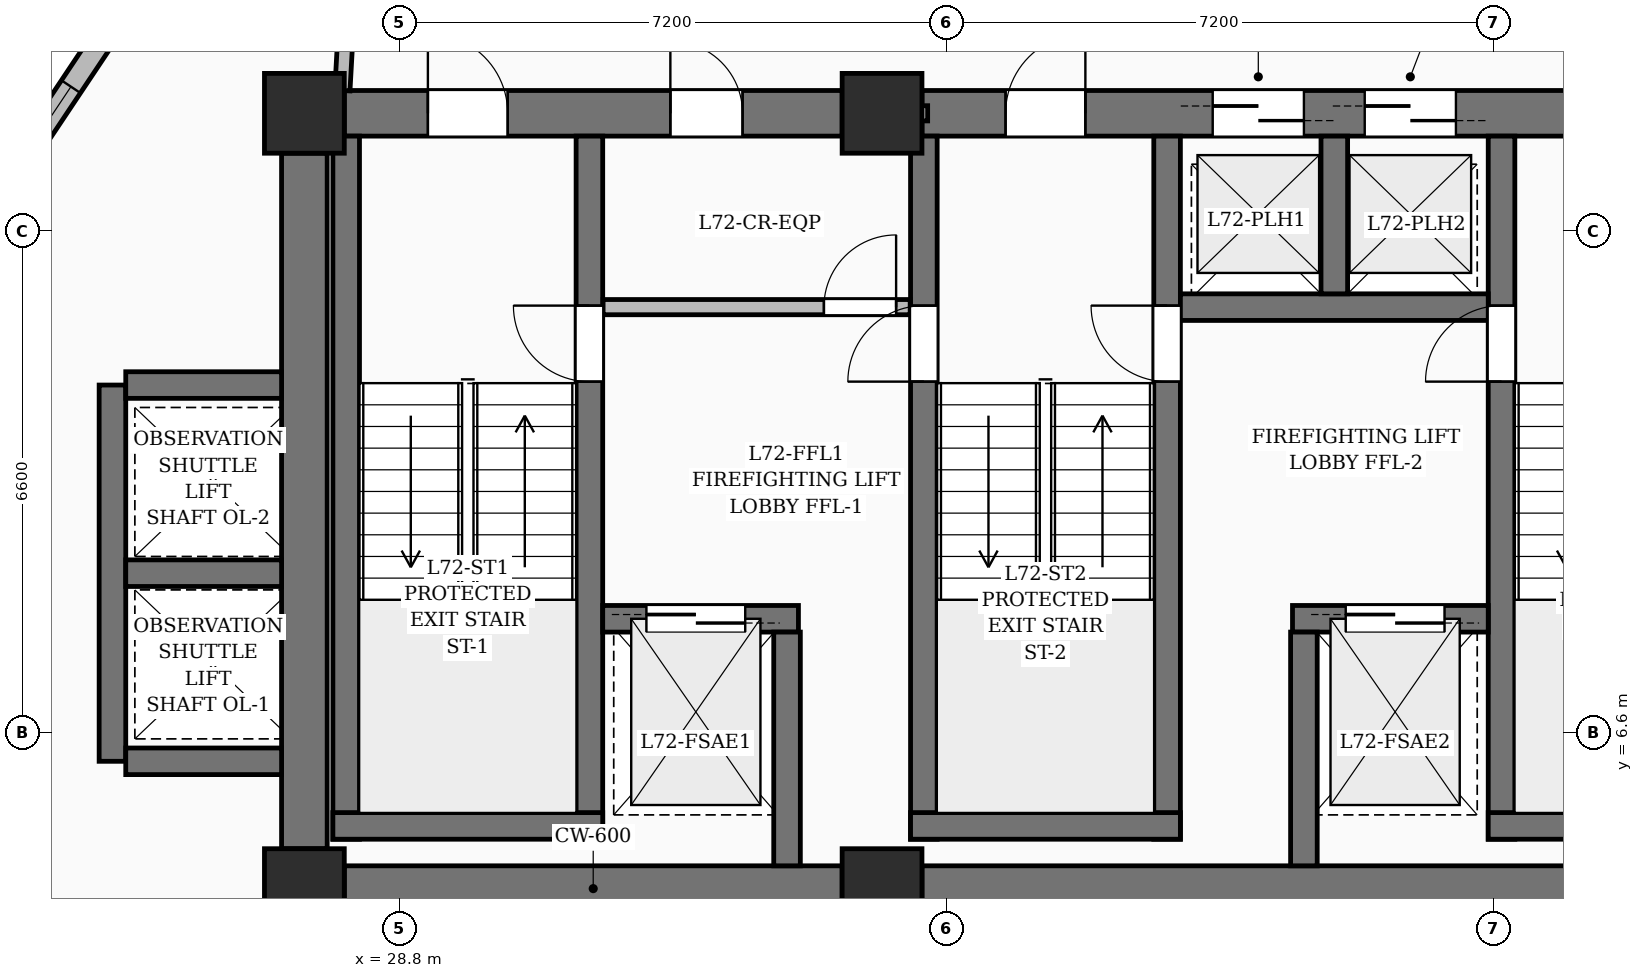
"""IFC4 building model, lengths in metres.
Left out: names, types, materials, properties, quantities, classifications, styles, units other than length and angle.
Written with IfcOpenShell. Run it as: python <this file> out.ifc"""

import sys

from ifc_helpers import new_model, si_unit, direction, frame, frame_2d, origin, origin_2d, place, context, subcontext, project, spatial, rectangle, extrude, element, fill, save


model = new_model("IFC4")
c1 = context("Model", 3, precision=1e-05, world=origin(), true_north=direction((0.0, 1.0)))
c2 = subcontext(c1, "Body", "Model", "MODEL_VIEW")
j1 = project(units=[si_unit("LENGTHUNIT", "METRE"), si_unit("PLANEANGLEUNIT", "RADIAN")], contexts=[c1])
p1 = place(None, origin())
s1 = spatial("IfcSite", under=j1, at=p1, CompositionType="ELEMENT")
p2 = place(p1, origin())
s2 = spatial("IfcBuilding", under=s1, at=p2, CompositionType="ELEMENT")
p3 = place(p2, frame((0.0, 0.0, 278.25)))
s3 = spatial("IfcBuildingStorey", under=s2, at=p3, CompositionType="ELEMENT", Elevation=278.25)
for number, where, z_axis, x_axis in (
    (1, (27.55, 4.55, 0.0), (0.0, 0.0, 1.0), (1.0, 0.0, 0.0)),
    (2, (35.15, 4.55, 0.0), (0.0, 0.0, 1.0), (1.0, 0.0, 0.0)),
    (3, (27.55, 14.75, 0.0), (0.0, 0.0, 1.0), (1.0, 0.0, 0.0)),
    (4, (35.15, 14.75, 0.0), (0.0, 0.0, 1.0), (1.0, 0.0, 0.0)),
):
    element("IfcColumn", number, at=place(p3, frame(where, z_axis=z_axis, x_axis=x_axis)), inside=s3, PredefinedType="COLUMN", context=c2, shape_type="SweptSolid", body=[
        extrude(rectangle(XDim=1.05, YDim=1.05, at=origin_2d()), origin(), (0.0, 0.0, 1.0), 3.75),
    ])
p4 = place(p3, frame((28.075, 4.55, 0.0), z_axis=(0.0, 0.0, 1.0), x_axis=(1.0, 0.0, 0.0)))
e5 = element("IfcWall", 5, at=p4, inside=s3, PredefinedType="SHEAR", context=c2, shape_type="SweptSolid", body=[
    extrude(rectangle(XDim=6.55, YDim=0.6, at=frame_2d((3.275, 0.0))), origin(), (0.0, 0.0, 1.0), 3.75),
])
p5 = place(p3, frame((35.675, 4.55, 0.0), z_axis=(0.0, 0.0, 1.0), x_axis=(1.0, 0.0, 0.0)))
e6 = element("IfcWall", 6, at=p5, inside=s3, PredefinedType="SHEAR", context=c2, shape_type="SweptSolid", body=[
    extrude(rectangle(XDim=10.85, YDim=0.6, at=frame_2d((5.425, 0.0))), origin(), (0.0, 0.0, 1.0), 3.75),
])
p6 = place(p3, frame((28.075, 14.75, 0.0), z_axis=(0.0, 0.0, 1.0), x_axis=(1.0, 0.0, 0.0)))
e7 = element("IfcWall", 7, at=p6, inside=s3, PredefinedType="SHEAR", context=c2, shape_type="SweptSolid", body=[
    extrude(rectangle(XDim=6.55, YDim=0.6, at=frame_2d((3.275, 0.0))), origin(), (0.0, 0.0, 1.0), 3.75),
])
p7 = place(p6, frame((1.1, 0.0, 0.0)))
e8 = element("IfcOpeningElement", 8, at=p7, cuts=e7, PredefinedType="OPENING", context=c2, shape_type="SweptSolid", body=[
    extrude(rectangle(XDim=1.05, YDim=2.15, at=frame_2d((0.525, 1.075))), frame((0.0, 0.31, 0.0), z_axis=(0.0, -1.0, 0.0), x_axis=(1.0, 0.0, 0.0)), (0.0, 0.0, 1.0), 0.62),
])
p8 = place(p6, frame((4.29, 0.0, 0.0)))
e9 = element("IfcOpeningElement", 9, at=p8, cuts=e7, PredefinedType="OPENING", context=c2, shape_type="SweptSolid", body=[
    extrude(rectangle(XDim=0.95, YDim=2.15, at=frame_2d((0.475, 1.075))), frame((0.0, 0.31, 0.0), z_axis=(0.0, -1.0, 0.0), x_axis=(1.0, 0.0, 0.0)), (0.0, 0.0, 1.0), 0.62),
])
p9 = place(p3, frame((35.675, 14.75, 0.0), z_axis=(0.0, 0.0, 1.0), x_axis=(1.0, 0.0, 0.0)))
e10 = element("IfcWall", 10, at=p9, inside=s3, PredefinedType="SHEAR", context=c2, shape_type="SweptSolid", body=[
    extrude(rectangle(XDim=10.85, YDim=0.6, at=frame_2d((5.425, 0.0))), origin(), (0.0, 0.0, 1.0), 3.75),
])
p10 = place(p9, frame((1.1, 0.0, 0.0)))
e11 = element("IfcOpeningElement", 11, at=p10, cuts=e10, PredefinedType="OPENING", context=c2, shape_type="SweptSolid", body=[
    extrude(rectangle(XDim=1.05, YDim=2.15, at=frame_2d((0.525, 1.075))), frame((0.0, 0.31, 0.0), z_axis=(0.0, -1.0, 0.0), x_axis=(1.0, 0.0, 0.0)), (0.0, 0.0, 1.0), 0.62),
])
p11 = place(p9, frame((8.7, 0.0, 0.0)))
e12 = element("IfcOpeningElement", 12, at=p11, cuts=e10, PredefinedType="OPENING", context=c2, shape_type="SweptSolid", body=[
    extrude(rectangle(XDim=1.05, YDim=2.15, at=frame_2d((0.525, 1.075))), frame((0.0, 0.31, 0.0), z_axis=(0.0, -1.0, 0.0), x_axis=(1.0, 0.0, 0.0)), (0.0, 0.0, 1.0), 0.62),
])
p12 = place(p9, frame((3.825, 0.0, 0.0)))
e13 = element("IfcOpeningElement", 13, at=p12, cuts=e10, PredefinedType="OPENING", context=c2, shape_type="SweptSolid", body=[
    extrude(rectangle(XDim=1.2, YDim=2.2, at=frame_2d((0.6, 1.1))), frame((0.0, 0.31, 0.0), z_axis=(0.0, -1.0, 0.0), x_axis=(1.0, 0.0, 0.0)), (0.0, 0.0, 1.0), 0.62),
])
p13 = place(p9, frame((5.825, 0.0, 0.0)))
e14 = element("IfcOpeningElement", 14, at=p13, cuts=e10, PredefinedType="OPENING", context=c2, shape_type="SweptSolid", body=[
    extrude(rectangle(XDim=1.2, YDim=2.2, at=frame_2d((0.6, 1.1))), frame((0.0, 0.31, 0.0), z_axis=(0.0, -1.0, 0.0), x_axis=(1.0, 0.0, 0.0)), (0.0, 0.0, 1.0), 0.62),
])
p14 = place(p3, frame((27.55, 5.075, 0.0), z_axis=(0.0, 0.0, 1.0), x_axis=(0.0, 1.0, 0.0)))
e15 = element("IfcWall", 15, at=p14, inside=s3, PredefinedType="SHEAR", context=c2, shape_type="SweptSolid", body=[
    extrude(rectangle(XDim=9.15, YDim=0.6, at=frame_2d((4.575, 0.0))), origin(), (0.0, 0.0, 1.0), 3.75),
])
p15 = place(p3, frame((28.1, 5.2, 0.0), z_axis=(0.0, 0.0, 1.0), x_axis=(0.0, 1.0, 0.0)))
e16 = element("IfcWall", 16, at=p15, inside=s3, PredefinedType="SOLIDWALL", context=c2, shape_type="SweptSolid", body=[
    extrude(rectangle(XDim=9.25, YDim=0.35, at=frame_2d((4.625, 0.0))), origin(), (0.0, 0.0, 1.0), 3.75),
])
p16 = place(p3, frame((31.3, 5.2, 0.0), z_axis=(0.0, 0.0, 1.0), x_axis=(0.0, 1.0, 0.0)))
e17 = element("IfcWall", 17, at=p16, inside=s3, PredefinedType="SOLIDWALL", context=c2, shape_type="SweptSolid", body=[
    extrude(rectangle(XDim=9.25, YDim=0.35, at=frame_2d((4.625, 0.0))), origin(), (0.0, 0.0, 1.0), 3.75),
])
p17 = place(p16, frame((6.02, 0.0, 0.0)))
e18 = element("IfcOpeningElement", 18, at=p17, cuts=e17, PredefinedType="OPENING", context=c2, shape_type="SweptSolid", body=[
    extrude(rectangle(XDim=1.0, YDim=2.15, at=frame_2d((0.5, 1.075))), frame((0.0, 0.185, 0.0), z_axis=(0.0, -1.0, 0.0), x_axis=(1.0, 0.0, 0.0)), (0.0, 0.0, 1.0), 0.37),
])
p18 = place(p3, frame((27.925, 5.375, 0.0), z_axis=(0.0, 0.0, 1.0), x_axis=(1.0, 0.0, 0.0)))
e19 = element("IfcWall", 19, at=p18, inside=s3, PredefinedType="SOLIDWALL", context=c2, shape_type="SweptSolid", body=[
    extrude(rectangle(XDim=3.55, YDim=0.35, at=frame_2d((1.775, 0.0))), origin(), (0.0, 0.0, 1.0), 3.75),
])
p19 = place(p3, frame((35.7, 5.2, 0.0), z_axis=(0.0, 0.0, 1.0), x_axis=(0.0, 1.0, 0.0)))
e20 = element("IfcWall", 20, at=p19, inside=s3, PredefinedType="SOLIDWALL", context=c2, shape_type="SweptSolid", body=[
    extrude(rectangle(XDim=9.25, YDim=0.35, at=frame_2d((4.625, 0.0))), origin(), (0.0, 0.0, 1.0), 3.75),
])
p20 = place(p19, frame((6.02, 0.0, 0.0)))
e21 = element("IfcOpeningElement", 21, at=p20, cuts=e20, PredefinedType="OPENING", context=c2, shape_type="SweptSolid", body=[
    extrude(rectangle(XDim=1.0, YDim=2.15, at=frame_2d((0.5, 1.075))), frame((0.0, 0.185, 0.0), z_axis=(0.0, -1.0, 0.0), x_axis=(1.0, 0.0, 0.0)), (0.0, 0.0, 1.0), 0.37),
])
p21 = place(p3, frame((38.9, 5.2, 0.0), z_axis=(0.0, 0.0, 1.0), x_axis=(0.0, 1.0, 0.0)))
e22 = element("IfcWall", 22, at=p21, inside=s3, PredefinedType="SOLIDWALL", context=c2, shape_type="SweptSolid", body=[
    extrude(rectangle(XDim=9.25, YDim=0.35, at=frame_2d((4.625, 0.0))), origin(), (0.0, 0.0, 1.0), 3.75),
])
p22 = place(p21, frame((6.02, 0.0, 0.0)))
e23 = element("IfcOpeningElement", 23, at=p22, cuts=e22, PredefinedType="OPENING", context=c2, shape_type="SweptSolid", body=[
    extrude(rectangle(XDim=1.0, YDim=2.15, at=frame_2d((0.5, 1.075))), frame((0.0, 0.185, 0.0), z_axis=(0.0, -1.0, 0.0), x_axis=(1.0, 0.0, 0.0)), (0.0, 0.0, 1.0), 0.37),
])
p23 = place(p3, frame((35.525, 5.375, 0.0), z_axis=(0.0, 0.0, 1.0), x_axis=(1.0, 0.0, 0.0)))
e24 = element("IfcWall", 24, at=p23, inside=s3, PredefinedType="SOLIDWALL", context=c2, shape_type="SweptSolid", body=[
    extrude(rectangle(XDim=3.55, YDim=0.35, at=frame_2d((1.775, 0.0))), origin(), (0.0, 0.0, 1.0), 3.75),
])
p24 = place(p3, frame((43.3, 5.2, 0.0), z_axis=(0.0, 0.0, 1.0), x_axis=(0.0, 1.0, 0.0)))
e25 = element("IfcWall", 25, at=p24, inside=s3, PredefinedType="SOLIDWALL", context=c2, shape_type="SweptSolid", body=[
    extrude(rectangle(XDim=9.25, YDim=0.35, at=frame_2d((4.625, 0.0))), origin(), (0.0, 0.0, 1.0), 3.75),
])
p25 = place(p24, frame((6.02, 0.0, 0.0)))
e26 = element("IfcOpeningElement", 26, at=p25, cuts=e25, PredefinedType="OPENING", context=c2, shape_type="SweptSolid", body=[
    extrude(rectangle(XDim=1.0, YDim=2.15, at=frame_2d((0.5, 1.075))), frame((0.0, 0.185, 0.0), z_axis=(0.0, -1.0, 0.0), x_axis=(1.0, 0.0, 0.0)), (0.0, 0.0, 1.0), 0.37),
])
p26 = place(p3, frame((43.125, 5.375, 0.0), z_axis=(0.0, 0.0, 1.0), x_axis=(1.0, 0.0, 0.0)))
e27 = element("IfcWall", 27, at=p26, inside=s3, PredefinedType="SOLIDWALL", context=c2, shape_type="SweptSolid", body=[
    extrude(rectangle(XDim=3.55, YDim=0.35, at=frame_2d((1.775, 0.0))), origin(), (0.0, 0.0, 1.0), 3.75),
])
p27 = place(p3, frame((31.475, 8.1, 0.0), z_axis=(0.0, 0.0, 1.0), x_axis=(1.0, 0.0, 0.0)))
e28 = element("IfcWall", 28, at=p27, inside=s3, PredefinedType="SOLIDWALL", context=c2, shape_type="SweptSolid", body=[
    extrude(rectangle(XDim=2.575, YDim=0.35, at=frame_2d((1.288, 0.0))), origin(), (0.0, 0.0, 1.0), 3.75),
])
p28 = place(p27, frame((0.575, 0.0, 0.0)))
e29 = element("IfcOpeningElement", 29, at=p28, cuts=e28, PredefinedType="OPENING", context=c2, shape_type="SweptSolid", body=[
    extrude(rectangle(XDim=1.3, YDim=2.25, at=frame_2d((0.65, 1.125))), frame((0.0, 0.185, 0.0), z_axis=(0.0, -1.0, 0.0), x_axis=(1.0, 0.0, 0.0)), (0.0, 0.0, 1.0), 0.37),
])
p29 = place(p3, frame((40.55, 8.1, 0.0), z_axis=(0.0, 0.0, 1.0), x_axis=(1.0, 0.0, 0.0)))
e30 = element("IfcWall", 30, at=p29, inside=s3, PredefinedType="SOLIDWALL", context=c2, shape_type="SweptSolid", body=[
    extrude(rectangle(XDim=2.575, YDim=0.35, at=frame_2d((1.288, 0.0))), origin(), (0.0, 0.0, 1.0), 3.75),
])
p30 = place(p29, frame((0.7, 0.0, 0.0)))
e31 = element("IfcOpeningElement", 31, at=p30, cuts=e30, PredefinedType="OPENING", context=c2, shape_type="SweptSolid", body=[
    extrude(rectangle(XDim=1.3, YDim=2.25, at=frame_2d((0.65, 1.125))), frame((0.0, 0.185, 0.0), z_axis=(0.0, -1.0, 0.0), x_axis=(1.0, 0.0, 0.0)), (0.0, 0.0, 1.0), 0.37),
])
for number, where, z_axis, x_axis in (
    (32, (33.9, 4.85, 0.0), (0.0, 0.0, 1.0), (0.0, 1.0, 0.0)),
    (33, (40.7, 4.85, 0.0), (0.0, 0.0, 1.0), (0.0, 1.0, 0.0)),
):
    element("IfcWall", number, at=place(p3, frame(where, z_axis=z_axis, x_axis=x_axis)), inside=s3, PredefinedType="SOLIDWALL", context=c2, shape_type="SweptSolid", body=[
        extrude(rectangle(XDim=3.075, YDim=0.35, at=frame_2d((1.538, 0.0))), origin(), (0.0, 0.0, 1.0), 3.75),
    ])
p31 = place(p3, frame((39.075, 12.2, 0.0), z_axis=(0.0, 0.0, 1.0), x_axis=(1.0, 0.0, 0.0)))
e34 = element("IfcWall", 34, at=p31, inside=s3, PredefinedType="SOLIDWALL", context=c2, shape_type="SweptSolid", body=[
    extrude(rectangle(XDim=4.05, YDim=0.35, at=frame_2d((2.025, 0.0))), origin(), (0.0, 0.0, 1.0), 3.75),
])
p32 = place(p3, frame((41.1, 12.375, 0.0), z_axis=(0.0, 0.0, 1.0), x_axis=(0.0, 1.0, 0.0)))
e35 = element("IfcWall", 35, at=p32, inside=s3, PredefinedType="SOLIDWALL", context=c2, shape_type="SweptSolid", body=[
    extrude(rectangle(XDim=2.075, YDim=0.35, at=frame_2d((1.038, 0.0))), origin(), (0.0, 0.0, 1.0), 3.75),
])
p33 = place(p3, frame((25.025, 6.225, 0.0), z_axis=(0.0, 0.0, 1.0), x_axis=(0.0, 1.0, 0.0)))
e36 = element("IfcWall", 36, at=p33, inside=s3, PredefinedType="SOLIDWALL", context=c2, shape_type="SweptSolid", body=[
    extrude(rectangle(XDim=4.95, YDim=0.35, at=frame_2d((2.475, 0.0))), origin(), (0.0, 0.0, 1.0), 3.75),
])
for number, where, z_axis, x_axis in (
    (37, (25.2, 6.225, 0.0), (0.0, 0.0, 1.0), (1.0, 0.0, 0.0)),
    (38, (25.2, 8.7, 0.0), (0.0, 0.0, 1.0), (1.0, 0.0, 0.0)),
    (39, (25.2, 11.175, 0.0), (0.0, 0.0, 1.0), (1.0, 0.0, 0.0)),
):
    element("IfcWall", number, at=place(p3, frame(where, z_axis=z_axis, x_axis=x_axis)), inside=s3, PredefinedType="SOLIDWALL", context=c2, shape_type="SweptSolid", body=[
        extrude(rectangle(XDim=2.05, YDim=0.35, at=frame_2d((1.025, 0.0))), origin(), (0.0, 0.0, 1.0), 3.75),
    ])
p34 = place(p3, frame((22.258, 11.773, 0.0), z_axis=(0.0, 0.0, 1.0), x_axis=(0.555209579516, 0.831710480163, 0.0)))
e40 = element("IfcWall", 40, at=p34, inside=s3, PredefinedType="SOLIDWALL", context=c2, shape_type="SweptSolid", body=[
    extrude(rectangle(XDim=7.851, YDim=0.3, at=frame_2d((3.926, 0.0))), origin(), (0.0, 0.0, 1.0), 3.5),
])
p35 = place(p34, frame((2.8, 0.0, 0.8)))
e41 = element("IfcOpeningElement", 41, at=p35, cuts=e40, PredefinedType="OPENING", context=c2, shape_type="SweptSolid", body=[
    extrude(rectangle(XDim=1.2, YDim=1.8, at=frame_2d((0.6, 0.9))), frame((0.0, 0.16, 0.0), z_axis=(0.0, -1.0, 0.0), x_axis=(1.0, 0.0, 0.0)), (0.0, 0.0, 1.0), 0.32),
])
p36 = place(p3, frame((34.72, 14.75, 0.0), z_axis=(0.0, 0.0, 1.0), x_axis=(1.0, 0.0, 0.0)))
e42 = element("IfcWall", 42, at=p36, inside=s3, PredefinedType="PARTITIONING", context=c2, shape_type="SweptSolid", body=[
    extrude(rectangle(XDim=1.03, YDim=0.2, at=frame_2d((0.515, 0.0))), origin(), (0.0, 0.0, 1.0), 2.685),
])
p37 = place(p3, frame((31.48, 12.2, 0.0), z_axis=(0.0, 0.0, 1.0), x_axis=(1.0, 0.0, 0.0)))
e43 = element("IfcWall", 43, at=p37, inside=s3, PredefinedType="PARTITIONING", context=c2, shape_type="SweptSolid", body=[
    extrude(rectangle(XDim=4.04, YDim=0.2, at=frame_2d((2.02, 0.0))), origin(), (0.0, 0.0, 1.0), 3.5),
])
p38 = place(p37, frame((2.905, 0.0, 0.0)))
e44 = element("IfcOpeningElement", 44, at=p38, cuts=e43, PredefinedType="OPENING", context=c2, shape_type="SweptSolid", body=[
    extrude(rectangle(XDim=0.95, YDim=2.15, at=frame_2d((0.475, 1.075))), frame((0.0, 0.11, 0.0), z_axis=(0.0, -1.0, 0.0), x_axis=(1.0, 0.0, 0.0)), (0.0, 0.0, 1.0), 0.22),
])
p39 = place(p3, frame((28.212, 17.976, 0.0), z_axis=(0.0, 0.0, 1.0), x_axis=(-0.055234698656, -0.998473398777, 0.0)))
e45 = element("IfcWall", 45, at=p39, inside=s3, PredefinedType="PARTITIONING", context=c2, shape_type="SweptSolid", body=[
    extrude(rectangle(XDim=2.93, YDim=0.2, at=frame_2d((1.465, 0.0))), origin(), (0.0, 0.0, 1.0), 3.5),
])
p40 = place(p35, origin())
e46 = element("IfcWindow", 46, at=p40, inside=s3, PartitioningType="SINGLE_PANEL", PredefinedType="WINDOW", context=c2, shape_type="SweptSolid", body=[
    extrude(rectangle(XDim=1.2, YDim=1.8, at=frame_2d((0.6, 0.9))), frame((0.0, 0.03, 0.0), z_axis=(0.0, -1.0, 0.0), x_axis=(1.0, 0.0, 0.0)), (0.0, 0.0, 1.0), 0.06),
])
fill(e41, e46)
p41 = place(p7, origin())
e47 = element("IfcDoor", 47, at=p41, inside=s3, OperationType="SINGLE_SWING_LEFT", PredefinedType="DOOR", context=c2, shape_type="SweptSolid", body=[
    extrude(rectangle(XDim=1.05, YDim=2.15, at=frame_2d((0.525, 1.075))), frame((0.0, 0.025, 0.0), z_axis=(0.0, -1.0, 0.0), x_axis=(1.0, 0.0, 0.0)), (0.0, 0.0, 1.0), 0.05),
])
fill(e8, e47)
p42 = place(p10, origin())
e48 = element("IfcDoor", 48, at=p42, inside=s3, OperationType="SINGLE_SWING_RIGHT", PredefinedType="DOOR", context=c2, shape_type="SweptSolid", body=[
    extrude(rectangle(XDim=1.05, YDim=2.15, at=frame_2d((0.525, 1.075))), frame((0.0, 0.025, 0.0), z_axis=(0.0, -1.0, 0.0), x_axis=(1.0, 0.0, 0.0)), (0.0, 0.0, 1.0), 0.05),
])
fill(e11, e48)
p43 = place(p17, origin())
e49 = element("IfcDoor", 49, at=p43, inside=s3, OperationType="SINGLE_SWING_RIGHT", PredefinedType="DOOR", context=c2, shape_type="SweptSolid", body=[
    extrude(rectangle(XDim=1.0, YDim=2.15, at=frame_2d((0.5, 1.075))), frame((0.0, 0.025, 0.0), z_axis=(0.0, -1.0, 0.0), x_axis=(1.0, 0.0, 0.0)), (0.0, 0.0, 1.0), 0.05),
])
fill(e18, e49)
p44 = place(p20, origin())
e50 = element("IfcDoor", 50, at=p44, inside=s3, OperationType="SINGLE_SWING_LEFT", PredefinedType="DOOR", context=c2, shape_type="SweptSolid", body=[
    extrude(rectangle(XDim=1.0, YDim=2.15, at=frame_2d((0.5, 1.075))), frame((0.0, 0.025, 0.0), z_axis=(0.0, -1.0, 0.0), x_axis=(1.0, 0.0, 0.0)), (0.0, 0.0, 1.0), 0.05),
])
fill(e21, e50)
p45 = place(p22, origin())
e51 = element("IfcDoor", 51, at=p45, inside=s3, OperationType="SINGLE_SWING_RIGHT", PredefinedType="DOOR", context=c2, shape_type="SweptSolid", body=[
    extrude(rectangle(XDim=1.0, YDim=2.15, at=frame_2d((0.5, 1.075))), frame((0.0, 0.025, 0.0), z_axis=(0.0, -1.0, 0.0), x_axis=(1.0, 0.0, 0.0)), (0.0, 0.0, 1.0), 0.05),
])
fill(e23, e51)
p46 = place(p25, origin())
e52 = element("IfcDoor", 52, at=p46, inside=s3, OperationType="SINGLE_SWING_LEFT", PredefinedType="DOOR", context=c2, shape_type="SweptSolid", body=[
    extrude(rectangle(XDim=1.0, YDim=2.15, at=frame_2d((0.5, 1.075))), frame((0.0, 0.025, 0.0), z_axis=(0.0, -1.0, 0.0), x_axis=(1.0, 0.0, 0.0)), (0.0, 0.0, 1.0), 0.05),
])
fill(e26, e52)
p47 = place(p28, origin())
e53 = element("IfcDoor", 53, at=p47, inside=s3, OperationType="DOUBLE_DOOR_SLIDING", PredefinedType="DOOR", context=c2, shape_type="SweptSolid", body=[
    extrude(rectangle(XDim=1.3, YDim=2.25, at=frame_2d((0.65, 1.125))), frame((0.0, 0.025, 0.0), z_axis=(0.0, -1.0, 0.0), x_axis=(1.0, 0.0, 0.0)), (0.0, 0.0, 1.0), 0.05),
])
fill(e29, e53)
p48 = place(p30, origin())
e54 = element("IfcDoor", 54, at=p48, inside=s3, OperationType="DOUBLE_DOOR_SLIDING", PredefinedType="DOOR", context=c2, shape_type="SweptSolid", body=[
    extrude(rectangle(XDim=1.3, YDim=2.25, at=frame_2d((0.65, 1.125))), frame((0.0, 0.025, 0.0), z_axis=(0.0, -1.0, 0.0), x_axis=(1.0, 0.0, 0.0)), (0.0, 0.0, 1.0), 0.05),
])
fill(e31, e54)
p49 = place(p12, origin())
e55 = element("IfcDoor", 55, at=p49, inside=s3, OperationType="DOUBLE_DOOR_SLIDING", PredefinedType="DOOR", context=c2, shape_type="SweptSolid", body=[
    extrude(rectangle(XDim=1.2, YDim=2.2, at=frame_2d((0.6, 1.1))), frame((0.0, 0.025, 0.0), z_axis=(0.0, -1.0, 0.0), x_axis=(1.0, 0.0, 0.0)), (0.0, 0.0, 1.0), 0.05),
])
fill(e13, e55)
p50 = place(p13, origin())
e56 = element("IfcDoor", 56, at=p50, inside=s3, OperationType="DOUBLE_DOOR_SLIDING", PredefinedType="DOOR", context=c2, shape_type="SweptSolid", body=[
    extrude(rectangle(XDim=1.2, YDim=2.2, at=frame_2d((0.6, 1.1))), frame((0.0, 0.025, 0.0), z_axis=(0.0, -1.0, 0.0), x_axis=(1.0, 0.0, 0.0)), (0.0, 0.0, 1.0), 0.05),
])
fill(e14, e56)
p51 = place(p38, origin())
e57 = element("IfcDoor", 57, at=p51, inside=s3, OperationType="SINGLE_SWING_RIGHT", PredefinedType="DOOR", context=c2, shape_type="SweptSolid", body=[
    extrude(rectangle(XDim=0.95, YDim=2.15, at=frame_2d((0.475, 1.075))), frame((0.0, 0.025, 0.0), z_axis=(0.0, -1.0, 0.0), x_axis=(1.0, 0.0, 0.0)), (0.0, 0.0, 1.0), 0.05),
])
fill(e44, e57)
p52 = place(p8, origin())
e58 = element("IfcDoor", 58, at=p52, inside=s3, OperationType="SINGLE_SWING_LEFT", PredefinedType="DOOR", context=c2, shape_type="SweptSolid", body=[
    extrude(rectangle(XDim=0.95, YDim=2.15, at=frame_2d((0.475, 1.075))), frame((0.0, 0.025, 0.0), z_axis=(0.0, -1.0, 0.0), x_axis=(1.0, 0.0, 0.0)), (0.0, 0.0, 1.0), 0.05),
])
fill(e9, e58)
save(model, sys.argv[1])
